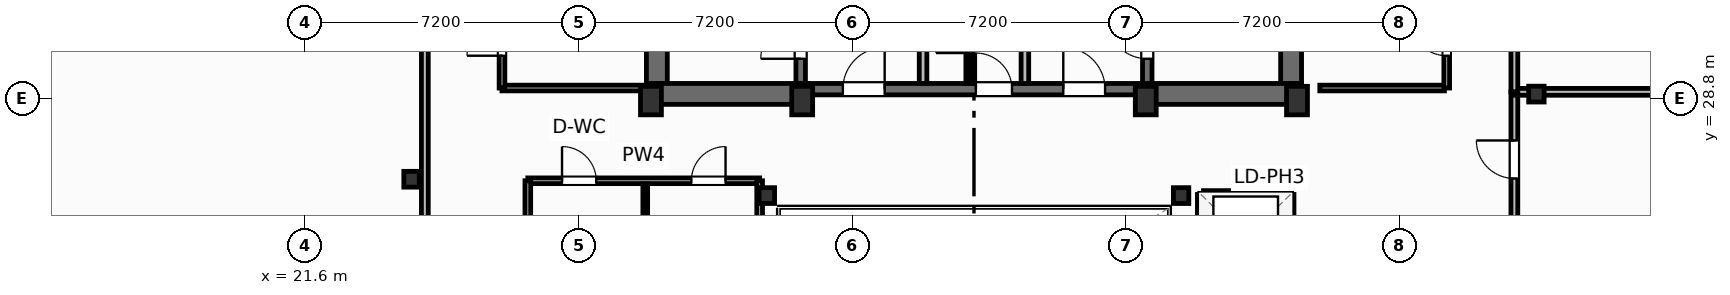
"""IFC4 building model, lengths in metres.
Left out: names, types, materials, properties, quantities, classifications, styles, units other than length and angle.
Written with IfcOpenShell. Run it as: python <this file> out.ifc"""

import sys

from ifc_helpers import new_model, si_unit, direction, frame, frame_2d, origin, origin_2d, place, context, subcontext, project, spatial, rectangle, i_section, extrude, element, fill, save


model = new_model("IFC4")
c1 = context("Model", 3, precision=1e-05, world=origin(), true_north=direction((0.0, 1.0)))
c2 = subcontext(c1, "Body", "Model", "MODEL_VIEW")
j1 = project(units=[si_unit("LENGTHUNIT", "METRE"), si_unit("PLANEANGLEUNIT", "RADIAN")], contexts=[c1])
p1 = place(None, origin())
s1 = spatial("IfcSite", under=j1, at=p1, CompositionType="ELEMENT")
p2 = place(p1, origin())
s2 = spatial("IfcBuilding", under=s1, at=p2, CompositionType="ELEMENT")
p3 = place(p2, frame((0.0, 0.0, 287.8)))
s3 = spatial("IfcBuildingStorey", under=s2, at=p3, CompositionType="ELEMENT", Elevation=287.8)
for number, where, z_axis, x_axis in (
    (1, (30.7, 28.75, 0.0), (0.0, 0.0, 1.0), (1.0, 0.0, 0.0)),
    (2, (34.68, 28.75, 0.0), (0.0, 0.0, 1.0), (1.0, 0.0, 0.0)),
    (3, (43.72, 28.75, 0.0), (0.0, 0.0, 1.0), (1.0, 0.0, 0.0)),
    (4, (47.7, 28.75, 0.0), (0.0, 0.0, 1.0), (1.0, 0.0, 0.0)),
):
    element("IfcColumn", number, at=place(p3, frame(where, z_axis=z_axis, x_axis=x_axis)), inside=s3, PredefinedType="COLUMN", context=c2, shape_type="SweptSolid", body=[
        extrude(rectangle(XDim=0.55, YDim=0.75, at=origin_2d()), origin(), (0.0, 0.0, 1.0), 3.7),
    ])
for number, where, z_axis, x_axis in (
    (5, (33.75, 26.25, 0.0), (0.0, 0.0, 1.0), (1.0, 0.0, 0.0)),
    (6, (44.65, 26.25, 0.0), (0.0, 0.0, 1.0), (1.0, 0.0, 0.0)),
    (7, (24.4, 26.68, 0.0), (0.0, 0.0, 1.0), (1.0, 0.0, 0.0)),
    (8, (54.0, 28.92, 0.0), (0.0, 0.0, 1.0), (1.0, 0.0, 0.0)),
):
    element("IfcColumn", number, at=place(p3, frame(where, z_axis=z_axis, x_axis=x_axis)), inside=s3, PredefinedType="COLUMN", context=c2, shape_type="SweptSolid", body=[
        extrude(i_section(OverallWidth=0.406, OverallDepth=0.416, WebThickness=0.03, FlangeThickness=0.048, FilletRadius=0.025, at=origin_2d()), origin(), (0.0, 0.0, 1.0), 3.7),
    ])
for number, where, z_axis, x_axis in (
    (9, (30.855, 29.2, 0.0), (0.0, 0.0, 1.0), (0.0, 1.0, 0.0)),
    (10, (47.545, 29.2, 0.0), (0.0, 0.0, 1.0), (0.0, 1.0, 0.0)),
):
    element("IfcWall", number, at=place(p3, frame(where, z_axis=z_axis, x_axis=x_axis)), inside=s3, PredefinedType="SHEAR", context=c2, shape_type="SweptSolid", body=[
        extrude(rectangle(XDim=9.22, YDim=0.55, at=frame_2d((4.61, 0.0))), origin(), (0.0, 0.0, 1.0), 3.38),
    ])
for number, where, z_axis, x_axis in (
    (11, (30.58, 28.925, 0.0), (0.0, 0.0, 1.0), (1.0, 0.0, 0.0)),
    (12, (43.6, 28.925, 0.0), (0.0, 0.0, 1.0), (1.0, 0.0, 0.0)),
):
    element("IfcWall", number, at=place(p3, frame(where, z_axis=z_axis, x_axis=x_axis)), inside=s3, PredefinedType="SHEAR", context=c2, shape_type="SweptSolid", body=[
        extrude(rectangle(XDim=4.22, YDim=0.55, at=frame_2d((2.11, 0.0))), origin(), (0.0, 0.0, 1.0), 3.38),
    ])
p4 = place(p3, frame((34.8, 29.05, 0.0), z_axis=(0.0, 0.0, 1.0), x_axis=(1.0, 0.0, 0.0)))
e13 = element("IfcWall", 13, at=p4, inside=s3, PredefinedType="SHEAR", context=c2, shape_type="SweptSolid", body=[
    extrude(rectangle(XDim=8.8, YDim=0.3, at=frame_2d((4.4, 0.0))), origin(), (0.0, 0.0, 1.0), 3.38),
])
p5 = place(p4, frame((0.95, 0.0, 0.0)))
e14 = element("IfcOpeningElement", 14, at=p5, cuts=e13, PredefinedType="OPENING", context=c2, shape_type="SweptSolid", body=[
    extrude(rectangle(XDim=1.1, YDim=2.15, at=frame_2d((0.55, 1.075))), frame((0.0, 0.16, 0.0), z_axis=(0.0, -1.0, 0.0), x_axis=(1.0, 0.0, 0.0)), (0.0, 0.0, 1.0), 0.32),
])
p6 = place(p4, frame((6.75, 0.0, 0.0)))
e15 = element("IfcOpeningElement", 15, at=p6, cuts=e13, PredefinedType="OPENING", context=c2, shape_type="SweptSolid", body=[
    extrude(rectangle(XDim=1.1, YDim=2.15, at=frame_2d((0.55, 1.075))), frame((0.0, 0.16, 0.0), z_axis=(0.0, -1.0, 0.0), x_axis=(1.0, 0.0, 0.0)), (0.0, 0.0, 1.0), 0.32),
])
p7 = place(p4, frame((4.45, 0.0, 0.0)))
e16 = element("IfcOpeningElement", 16, at=p7, cuts=e13, PredefinedType="OPENING", context=c2, shape_type="SweptSolid", body=[
    extrude(rectangle(XDim=0.95, YDim=2.15, at=frame_2d((0.475, 1.075))), frame((0.0, 0.16, 0.0), z_axis=(0.0, -1.0, 0.0), x_axis=(1.0, 0.0, 0.0)), (0.0, 0.0, 1.0), 0.32),
])
p8 = place(p3, frame((34.64, 29.2, 0.0), z_axis=(0.0, 0.0, 1.0), x_axis=(0.0, 1.0, 0.0)))
e17 = element("IfcWall", 17, at=p8, inside=s3, PredefinedType="SHEAR", context=c2, shape_type="SweptSolid", body=[
    extrude(rectangle(XDim=9.22, YDim=0.25, at=frame_2d((4.61, 0.0))), origin(), (0.0, 0.0, 1.0), 3.38),
])
p9 = place(p8, frame((0.65, 0.0, 0.0)))
e18 = element("IfcOpeningElement", 18, at=p9, cuts=e17, PredefinedType="OPENING", context=c2, shape_type="SweptSolid", body=[
    extrude(rectangle(XDim=1.05, YDim=2.15, at=frame_2d((0.525, 1.075))), frame((0.0, 0.135, 0.0), z_axis=(0.0, -1.0, 0.0), x_axis=(1.0, 0.0, 0.0)), (0.0, 0.0, 1.0), 0.27),
])
p10 = place(p3, frame((43.76, 29.2, 0.0), z_axis=(0.0, 0.0, 1.0), x_axis=(0.0, 1.0, 0.0)))
e19 = element("IfcWall", 19, at=p10, inside=s3, PredefinedType="SHEAR", context=c2, shape_type="SweptSolid", body=[
    extrude(rectangle(XDim=9.22, YDim=0.25, at=frame_2d((4.61, 0.0))), origin(), (0.0, 0.0, 1.0), 3.38),
])
p11 = place(p10, frame((0.65, 0.0, 0.0)))
e20 = element("IfcOpeningElement", 20, at=p11, cuts=e19, PredefinedType="OPENING", context=c2, shape_type="SweptSolid", body=[
    extrude(rectangle(XDim=1.05, YDim=2.15, at=frame_2d((0.525, 1.075))), frame((0.0, 0.135, 0.0), z_axis=(0.0, -1.0, 0.0), x_axis=(1.0, 0.0, 0.0)), (0.0, 0.0, 1.0), 0.27),
])
p12 = place(p3, frame((27.46, 26.64, 0.0), z_axis=(0.0, 0.0, 1.0), x_axis=(1.0, 0.0, 0.0)))
e21 = element("IfcWall", 21, at=p12, inside=s3, PredefinedType="PARTITIONING", context=c2, shape_type="SweptSolid", body=[
    extrude(rectangle(XDim=6.1, YDim=0.15, at=frame_2d((3.05, 0.0))), origin(), (0.0, 0.0, 1.0), 2.592),
])
p13 = place(p12, frame((0.9, 0.0, 0.0)))
e22 = element("IfcOpeningElement", 22, at=p13, cuts=e21, PredefinedType="OPENING", context=c2, shape_type="SweptSolid", body=[
    extrude(rectangle(XDim=0.9, YDim=2.05, at=frame_2d((0.45, 1.025))), frame((0.0, 0.085, 0.0), z_axis=(0.0, -1.0, 0.0), x_axis=(1.0, 0.0, 0.0)), (0.0, 0.0, 1.0), 0.17),
])
p14 = place(p12, frame((4.303, 0.0, 0.0)))
e23 = element("IfcOpeningElement", 23, at=p14, cuts=e21, PredefinedType="OPENING", context=c2, shape_type="SweptSolid", body=[
    extrude(rectangle(XDim=0.9, YDim=2.05, at=frame_2d((0.45, 1.025))), frame((0.0, 0.085, 0.0), z_axis=(0.0, -1.0, 0.0), x_axis=(1.0, 0.0, 0.0)), (0.0, 0.0, 1.0), 0.17),
])
p15 = place(p3, frame((30.55, 19.38, 0.0), z_axis=(0.0, 0.0, 1.0), x_axis=(0.0, 1.0, 0.0)))
e24 = element("IfcWall", 24, at=p15, inside=s3, PredefinedType="PARTITIONING", context=c2, shape_type="SweptSolid", body=[
    extrude(rectangle(XDim=7.18, YDim=0.125, at=frame_2d((3.59, 0.0))), origin(), (0.0, 0.0, 1.0), 3.38),
])
p16 = place(p3, frame((27.46, 19.3, 0.0), z_axis=(0.0, 0.0, 1.0), x_axis=(0.0, 1.0, 0.0)))
e25 = element("IfcWall", 25, at=p16, inside=s3, PredefinedType="PARTITIONING", context=c2, shape_type="SweptSolid", body=[
    extrude(rectangle(XDim=7.34, YDim=0.15, at=frame_2d((3.67, 0.0))), origin(), (0.0, 0.0, 1.0), 3.38),
])
p17 = place(p3, frame((33.56, 19.3, 0.0), z_axis=(0.0, 0.0, 1.0), x_axis=(0.0, 1.0, 0.0)))
e26 = element("IfcWall", 26, at=p17, inside=s3, PredefinedType="PARTITIONING", context=c2, shape_type="SweptSolid", body=[
    extrude(rectangle(XDim=7.34, YDim=0.15, at=frame_2d((3.67, 0.0))), origin(), (0.0, 0.0, 1.0), 2.754),
])
p18 = place(p3, frame((24.75, 16.85, 0.0), z_axis=(0.0, 0.0, 1.0), x_axis=(0.0, 1.0, 0.0)))
e27 = element("IfcWall", 27, at=p18, inside=s3, PredefinedType="PARTITIONING", context=c2, shape_type="SweptSolid", body=[
    extrude(rectangle(XDim=23.325, YDim=0.18, at=frame_2d((11.663, 0.0))), origin(), (0.0, 0.0, 1.0), 3.38),
])
p19 = place(p18, frame((6.0, 0.0, 0.0)))
e28 = element("IfcOpeningElement", 28, at=p19, cuts=e27, PredefinedType="OPENING", context=c2, shape_type="SweptSolid", body=[
    extrude(rectangle(XDim=1.0, YDim=2.05, at=frame_2d((0.5, 1.025))), frame((0.0, 0.1, 0.0), z_axis=(0.0, -1.0, 0.0), x_axis=(1.0, 0.0, 0.0)), (0.0, 0.0, 1.0), 0.2),
])
p20 = place(p3, frame((53.42, 19.3, 0.0), z_axis=(0.0, 0.0, 1.0), x_axis=(0.0, 1.0, 0.0)))
e29 = element("IfcWall", 29, at=p20, inside=s3, PredefinedType="PARTITIONING", context=c2, shape_type="SweptSolid", body=[
    extrude(rectangle(XDim=9.68, YDim=0.18, at=frame_2d((4.84, 0.0))), origin(), (0.0, 0.0, 1.0), 3.38),
])
p21 = place(p20, frame((7.4, 0.0, 0.0)))
e30 = element("IfcOpeningElement", 30, at=p21, cuts=e29, PredefinedType="OPENING", context=c2, shape_type="SweptSolid", body=[
    extrude(rectangle(XDim=1.0, YDim=2.05, at=frame_2d((0.5, 1.025))), frame((0.0, 0.1, 0.0), z_axis=(0.0, -1.0, 0.0), x_axis=(1.0, 0.0, 0.0)), (0.0, 0.0, 1.0), 0.2),
])
p22 = place(p3, frame((53.42, 28.98, 0.0), z_axis=(0.0, 0.0, 1.0), x_axis=(1.0, 0.0, 0.0)))
e31 = element("IfcWall", 31, at=p22, inside=s3, PredefinedType="PARTITIONING", context=c2, shape_type="SweptSolid", body=[
    extrude(rectangle(XDim=16.58, YDim=0.18, at=frame_2d((8.29, 0.0))), origin(), (0.0, 0.0, 1.0), 2.592),
])
p23 = place(p3, frame((53.42, 28.98, 0.0), z_axis=(0.0, 0.0, 1.0), x_axis=(0.0, 1.0, 0.0)))
e32 = element("IfcWall", 32, at=p23, inside=s3, PredefinedType="PARTITIONING", context=c2, shape_type="SweptSolid", body=[
    extrude(rectangle(XDim=10.34, YDim=0.18, at=frame_2d((5.17, 0.0))), origin(), (0.0, 0.0, 1.0), 3.38),
])
p24 = place(p23, frame((2.4, 0.0, 0.0)))
e33 = element("IfcOpeningElement", 33, at=p24, cuts=e32, PredefinedType="OPENING", context=c2, shape_type="SweptSolid", body=[
    extrude(rectangle(XDim=1.0, YDim=2.05, at=frame_2d((0.5, 1.025))), frame((0.0, 0.1, 0.0), z_axis=(0.0, -1.0, 0.0), x_axis=(1.0, 0.0, 0.0)), (0.0, 0.0, 1.0), 0.2),
])
for number, where, z_axis, x_axis in (
    (34, (37.86, 29.2, 0.0), (0.0, 0.0, 1.0), (0.0, 1.0, 0.0)),
    (35, (40.54, 29.2, 0.0), (0.0, 0.0, 1.0), (0.0, 1.0, 0.0)),
):
    element("IfcWall", number, at=place(p3, frame(where, z_axis=z_axis, x_axis=x_axis)), inside=s3, PredefinedType="PARTITIONING", context=c2, shape_type="SweptSolid", body=[
        extrude(rectangle(XDim=5.18, YDim=0.2, at=frame_2d((2.59, 0.0))), origin(), (0.0, 0.0, 1.0), 3.38),
    ])
p25 = place(p3, frame((39.05, 29.2, 0.0), z_axis=(0.0, 0.0, 1.0), x_axis=(0.0, 1.0, 0.0)))
e36 = element("IfcWall", 36, at=p25, inside=s3, PredefinedType="PARTITIONING", context=c2, shape_type="SweptSolid", body=[
    extrude(rectangle(XDim=5.22, YDim=0.125, at=frame_2d((2.61, 0.0))), origin(), (0.0, 0.0, 1.0), 3.38),
])
p26 = place(p25, frame((0.8, 0.0, 0.0)))
e37 = element("IfcOpeningElement", 37, at=p26, cuts=e36, PredefinedType="OPENING", context=c2, shape_type="SweptSolid", body=[
    extrude(rectangle(XDim=0.85, YDim=2.05, at=frame_2d((0.425, 1.025))), frame((0.0, 0.073, 0.0), z_axis=(0.0, -1.0, 0.0), x_axis=(1.0, 0.0, 0.0)), (0.0, 0.0, 1.0), 0.145),
])
p27 = place(p25, frame((3.4, 0.0, 0.0)))
e38 = element("IfcOpeningElement", 38, at=p27, cuts=e36, PredefinedType="OPENING", context=c2, shape_type="SweptSolid", body=[
    extrude(rectangle(XDim=0.85, YDim=2.05, at=frame_2d((0.425, 1.025))), frame((0.0, 0.073, 0.0), z_axis=(0.0, -1.0, 0.0), x_axis=(1.0, 0.0, 0.0)), (0.0, 0.0, 1.0), 0.145),
])
p28 = place(p3, frame((26.78, 29.08, 0.0), z_axis=(0.0, 0.0, 1.0), x_axis=(1.0, 0.0, 0.0)))
e39 = element("IfcWall", 39, at=p28, inside=s3, PredefinedType="PARTITIONING", context=c2, shape_type="SweptSolid", body=[
    extrude(rectangle(XDim=3.8, YDim=0.15, at=frame_2d((1.9, 0.0))), origin(), (0.0, 0.0, 1.0), 3.38),
])
p29 = place(p3, frame((26.78, 29.08, 0.0), z_axis=(0.0, 0.0, 1.0), x_axis=(0.0, 1.0, 0.0)))
e40 = element("IfcWall", 40, at=p29, inside=s3, PredefinedType="PARTITIONING", context=c2, shape_type="SweptSolid", body=[
    extrude(rectangle(XDim=5.87, YDim=0.15, at=frame_2d((2.935, 0.0))), origin(), (0.0, 0.0, 1.0), 3.38),
])
p30 = place(p29, frame((0.85, 0.0, 0.0)))
e41 = element("IfcOpeningElement", 41, at=p30, cuts=e40, PredefinedType="OPENING", context=c2, shape_type="SweptSolid", body=[
    extrude(rectangle(XDim=0.92, YDim=2.05, at=frame_2d((0.46, 1.025))), frame((0.0, 0.085, 0.0), z_axis=(0.0, -1.0, 0.0), x_axis=(1.0, 0.0, 0.0)), (0.0, 0.0, 1.0), 0.17),
])
p31 = place(p29, frame((3.45, 0.0, 0.0)))
e42 = element("IfcOpeningElement", 42, at=p31, cuts=e40, PredefinedType="OPENING", context=c2, shape_type="SweptSolid", body=[
    extrude(rectangle(XDim=0.85, YDim=2.05, at=frame_2d((0.425, 1.025))), frame((0.0, 0.085, 0.0), z_axis=(0.0, -1.0, 0.0), x_axis=(1.0, 0.0, 0.0)), (0.0, 0.0, 1.0), 0.17),
])
p32 = place(p3, frame((48.3, 29.08, 0.0), z_axis=(0.0, 0.0, 1.0), x_axis=(1.0, 0.0, 0.0)))
e43 = element("IfcWall", 43, at=p32, inside=s3, PredefinedType="PARTITIONING", context=c2, shape_type="SweptSolid", body=[
    extrude(rectangle(XDim=3.28, YDim=0.15, at=frame_2d((1.64, 0.0))), origin(), (0.0, 0.0, 1.0), 2.592),
])
p33 = place(p3, frame((51.64, 29.08, 0.0), z_axis=(0.0, 0.0, 1.0), x_axis=(0.0, 1.0, 0.0)))
e44 = element("IfcWall", 44, at=p33, inside=s3, PredefinedType="PARTITIONING", context=c2, shape_type="SweptSolid", body=[
    extrude(rectangle(XDim=6.88, YDim=0.15, at=frame_2d((3.44, 0.0))), origin(), (0.0, 0.0, 1.0), 3.38),
])
p34 = place(p33, frame((0.85, 0.0, 0.0)))
e45 = element("IfcOpeningElement", 45, at=p34, cuts=e44, PredefinedType="OPENING", context=c2, shape_type="SweptSolid", body=[
    extrude(rectangle(XDim=0.95, YDim=2.05, at=frame_2d((0.475, 1.025))), frame((0.0, 0.085, 0.0), z_axis=(0.0, -1.0, 0.0), x_axis=(1.0, 0.0, 0.0)), (0.0, 0.0, 1.0), 0.17),
])
p35 = place(p3, frame((45.24, 26.28, 0.0), z_axis=(0.0, 0.0, 1.0), x_axis=(1.0, 0.0, 0.0)))
e46 = element("IfcWall", 46, at=p35, inside=s3, PredefinedType="PARTITIONING", context=c2, shape_type="SweptSolid", body=[
    extrude(rectangle(XDim=2.22, YDim=0.2, at=frame_2d((1.11, 0.0))), origin(), (0.0, 0.0, 1.0), 3.38),
])
p36 = place(p3, frame((45.18, 19.38, 0.0), z_axis=(0.0, 0.0, 1.0), x_axis=(0.0, 1.0, 0.0)))
e47 = element("IfcWall", 47, at=p36, inside=s3, PredefinedType="PARTITIONING", context=c2, shape_type="SweptSolid", body=[
    extrude(rectangle(XDim=6.9, YDim=0.2, at=frame_2d((3.45, 0.0))), origin(), (0.0, 0.0, 1.0), 3.38),
])
p37 = place(p3, frame((47.52, 19.38, 0.0), z_axis=(0.0, 0.0, 1.0), x_axis=(0.0, 1.0, 0.0)))
e48 = element("IfcWall", 48, at=p37, inside=s3, PredefinedType="PARTITIONING", context=c2, shape_type="SweptSolid", body=[
    extrude(rectangle(XDim=6.9, YDim=0.2, at=frame_2d((3.45, 0.0))), origin(), (0.0, 0.0, 1.0), 3.38),
])
p38 = place(p37, frame((0.59, 0.0, 0.0)))
e49 = element("IfcOpeningElement", 49, at=p38, cuts=e48, PredefinedType="OPENING", context=c2, shape_type="SweptSolid", body=[
    extrude(rectangle(XDim=1.1, YDim=2.15, at=frame_2d((0.55, 1.075))), frame((0.0, 0.11, 0.0), z_axis=(0.0, -1.0, 0.0), x_axis=(1.0, 0.0, 0.0)), (0.0, 0.0, 1.0), 0.22),
])
p39 = place(p37, frame((2.89, 0.0, 0.0)))
e50 = element("IfcOpeningElement", 50, at=p39, cuts=e48, PredefinedType="OPENING", context=c2, shape_type="SweptSolid", body=[
    extrude(rectangle(XDim=1.1, YDim=2.15, at=frame_2d((0.55, 1.075))), frame((0.0, 0.11, 0.0), z_axis=(0.0, -1.0, 0.0), x_axis=(1.0, 0.0, 0.0)), (0.0, 0.0, 1.0), 0.22),
])
p40 = place(p37, frame((5.19, 0.0, 0.0)))
e51 = element("IfcOpeningElement", 51, at=p40, cuts=e48, PredefinedType="OPENING", context=c2, shape_type="SweptSolid", body=[
    extrude(rectangle(XDim=1.1, YDim=2.15, at=frame_2d((0.55, 1.075))), frame((0.0, 0.11, 0.0), z_axis=(0.0, -1.0, 0.0), x_axis=(1.0, 0.0, 0.0)), (0.0, 0.0, 1.0), 0.22),
])
p41 = place(p13, origin())
e52 = element("IfcDoor", 52, at=p41, inside=s3, OperationType="SINGLE_SWING_LEFT", PredefinedType="DOOR", context=c2, shape_type="SweptSolid", body=[
    extrude(rectangle(XDim=0.9, YDim=2.05, at=frame_2d((0.45, 1.025))), frame((0.0, 0.025, 0.0), z_axis=(0.0, -1.0, 0.0), x_axis=(1.0, 0.0, 0.0)), (0.0, 0.0, 1.0), 0.05),
])
fill(e22, e52)
p42 = place(p14, origin())
e53 = element("IfcDoor", 53, at=p42, inside=s3, OperationType="SINGLE_SWING_RIGHT", PredefinedType="DOOR", context=c2, shape_type="SweptSolid", body=[
    extrude(rectangle(XDim=0.9, YDim=2.05, at=frame_2d((0.45, 1.025))), frame((0.0, 0.025, 0.0), z_axis=(0.0, -1.0, 0.0), x_axis=(1.0, 0.0, 0.0)), (0.0, 0.0, 1.0), 0.05),
])
fill(e23, e53)
p43 = place(p21, origin())
e54 = element("IfcDoor", 54, at=p43, inside=s3, OperationType="SINGLE_SWING_RIGHT", PredefinedType="DOOR", context=c2, shape_type="SweptSolid", body=[
    extrude(rectangle(XDim=1.0, YDim=2.05, at=frame_2d((0.5, 1.025))), frame((0.0, 0.025, 0.0), z_axis=(0.0, -1.0, 0.0), x_axis=(1.0, 0.0, 0.0)), (0.0, 0.0, 1.0), 0.05),
])
fill(e30, e54)
p44 = place(p9, origin())
e55 = element("IfcDoor", 55, at=p44, inside=s3, OperationType="SINGLE_SWING_LEFT", PredefinedType="DOOR", context=c2, shape_type="SweptSolid", body=[
    extrude(rectangle(XDim=1.05, YDim=2.15, at=frame_2d((0.525, 1.075))), frame((0.0, 0.025, 0.0), z_axis=(0.0, -1.0, 0.0), x_axis=(1.0, 0.0, 0.0)), (0.0, 0.0, 1.0), 0.05),
])
fill(e18, e55)
p45 = place(p11, origin())
e56 = element("IfcDoor", 56, at=p45, inside=s3, OperationType="SINGLE_SWING_RIGHT", PredefinedType="DOOR", context=c2, shape_type="SweptSolid", body=[
    extrude(rectangle(XDim=1.05, YDim=2.15, at=frame_2d((0.525, 1.075))), frame((0.0, 0.025, 0.0), z_axis=(0.0, -1.0, 0.0), x_axis=(1.0, 0.0, 0.0)), (0.0, 0.0, 1.0), 0.05),
])
fill(e20, e56)
p46 = place(p5, origin())
e57 = element("IfcDoor", 57, at=p46, inside=s3, OperationType="SINGLE_SWING_RIGHT", PredefinedType="DOOR", context=c2, shape_type="SweptSolid", body=[
    extrude(rectangle(XDim=1.1, YDim=2.15, at=frame_2d((0.55, 1.075))), frame((0.0, 0.025, 0.0), z_axis=(0.0, -1.0, 0.0), x_axis=(1.0, 0.0, 0.0)), (0.0, 0.0, 1.0), 0.05),
])
fill(e14, e57)
p47 = place(p6, origin())
e58 = element("IfcDoor", 58, at=p47, inside=s3, OperationType="SINGLE_SWING_LEFT", PredefinedType="DOOR", context=c2, shape_type="SweptSolid", body=[
    extrude(rectangle(XDim=1.1, YDim=2.15, at=frame_2d((0.55, 1.075))), frame((0.0, 0.025, 0.0), z_axis=(0.0, -1.0, 0.0), x_axis=(1.0, 0.0, 0.0)), (0.0, 0.0, 1.0), 0.05),
])
fill(e15, e58)
p48 = place(p26, origin())
e59 = element("IfcDoor", 59, at=p48, inside=s3, OperationType="SINGLE_SWING_LEFT", PredefinedType="DOOR", context=c2, shape_type="SweptSolid", body=[
    extrude(rectangle(XDim=0.85, YDim=2.05, at=frame_2d((0.425, 1.025))), frame((0.0, 0.025, 0.0), z_axis=(0.0, -1.0, 0.0), x_axis=(1.0, 0.0, 0.0)), (0.0, 0.0, 1.0), 0.05),
])
fill(e37, e59)
p49 = place(p7, origin())
e60 = element("IfcDoor", 60, at=p49, inside=s3, OperationType="SINGLE_SWING_LEFT", PredefinedType="DOOR", context=c2, shape_type="SweptSolid", body=[
    extrude(rectangle(XDim=0.95, YDim=2.15, at=frame_2d((0.475, 1.075))), frame((0.0, 0.025, 0.0), z_axis=(0.0, -1.0, 0.0), x_axis=(1.0, 0.0, 0.0)), (0.0, 0.0, 1.0), 0.05),
])
fill(e16, e60)
p50 = place(p30, origin())
e61 = element("IfcDoor", 61, at=p50, inside=s3, OperationType="SINGLE_SWING_LEFT", PredefinedType="DOOR", context=c2, shape_type="SweptSolid", body=[
    extrude(rectangle(XDim=0.92, YDim=2.05, at=frame_2d((0.46, 1.025))), frame((0.0, 0.025, 0.0), z_axis=(0.0, -1.0, 0.0), x_axis=(1.0, 0.0, 0.0)), (0.0, 0.0, 1.0), 0.05),
])
fill(e41, e61)
p51 = place(p34, origin())
e62 = element("IfcDoor", 62, at=p51, inside=s3, OperationType="SINGLE_SWING_RIGHT", PredefinedType="DOOR", context=c2, shape_type="SweptSolid", body=[
    extrude(rectangle(XDim=0.95, YDim=2.05, at=frame_2d((0.475, 1.025))), frame((0.0, 0.025, 0.0), z_axis=(0.0, -1.0, 0.0), x_axis=(1.0, 0.0, 0.0)), (0.0, 0.0, 1.0), 0.05),
])
fill(e45, e62)
save(model, sys.argv[1])
